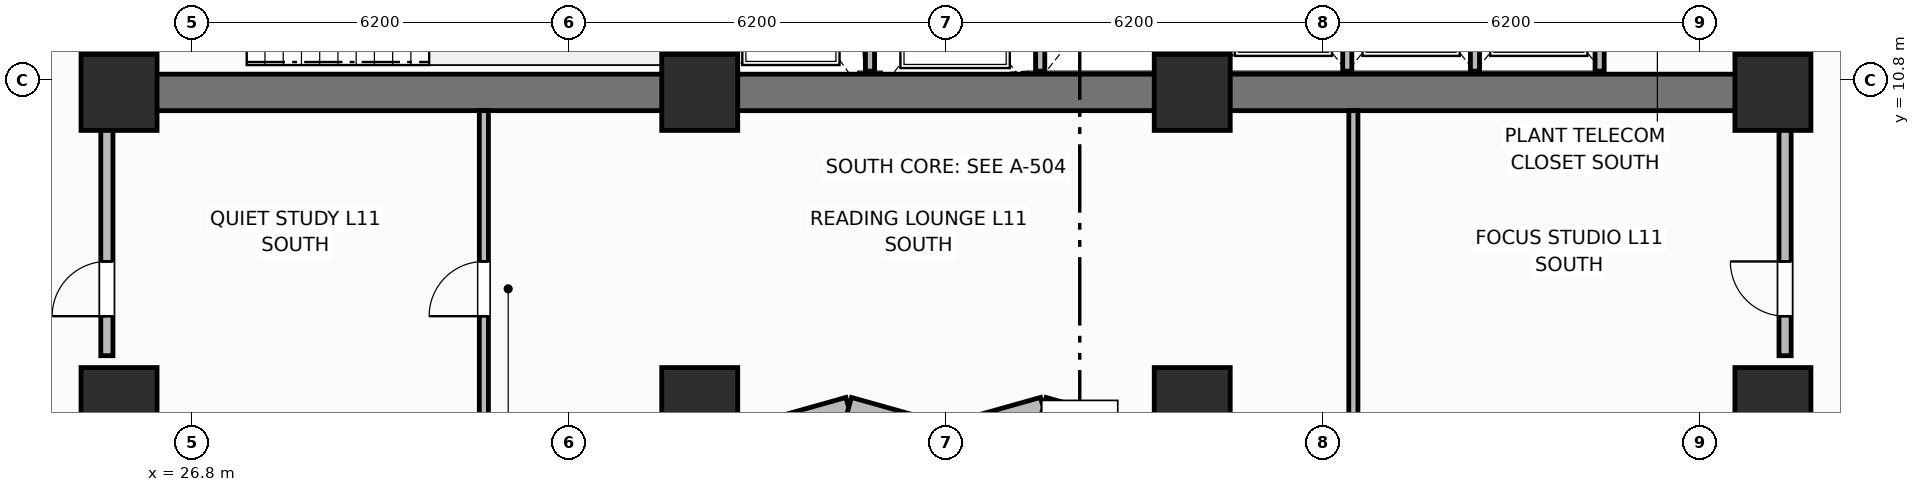
"""IFC4 building model, lengths in metres.
Left out: names, types, materials, properties, quantities, classifications, styles, units other than length and angle.
Written with IfcOpenShell. Run it as: python <this file> out.ifc"""

import sys

from ifc_helpers import new_model, si_unit, direction, frame, frame_2d, origin, origin_2d, place, context, subcontext, project, spatial, rectangle, extrude, element, fill, save


model = new_model("IFC4")
c1 = context("Model", 3, precision=1e-05, world=origin(), true_north=direction((0.0, 1.0)))
c2 = subcontext(c1, "Body", "Model", "MODEL_VIEW")
j1 = project(units=[si_unit("LENGTHUNIT", "METRE"), si_unit("PLANEANGLEUNIT", "RADIAN")], contexts=[c1])
p1 = place(None, origin())
s1 = spatial("IfcSite", under=j1, at=p1, CompositionType="ELEMENT")
p2 = place(p1, origin())
s2 = spatial("IfcBuilding", under=s1, at=p2, CompositionType="ELEMENT")
p3 = place(p2, frame((0.0, 0.0, 47.3)))
s3 = spatial("IfcBuildingStorey", under=s2, at=p3, CompositionType="ELEMENT", Elevation=47.3)
p4 = place(p3, frame((52.8, 10.6, 0.0), z_axis=(0.0, 0.0, 1.0), x_axis=(-1.0, 0.0, 0.0)))
e1 = element("IfcWall", 1, at=p4, inside=s3, PredefinedType="SHEAR", context=c2, shape_type="SweptSolid", body=[
    extrude(rectangle(XDim=27.2, YDim=0.6, at=frame_2d((13.6, 0.0))), origin(), (0.0, 0.0, 1.0), 3.7),
])
for number, where, z_axis, x_axis in (
    (2, (25.6, 10.9, 0.0), (0.0, 0.0, 1.0), (0.0, 1.0, 0.0)),
    (3, (52.8, 10.9, 0.0), (0.0, 0.0, 1.0), (0.0, 1.0, 0.0)),
):
    element("IfcWall", number, at=place(p3, frame(where, z_axis=z_axis, x_axis=x_axis)), inside=s3, PredefinedType="SHEAR", context=c2, shape_type="SweptSolid", body=[
        extrude(rectangle(XDim=5.6, YDim=0.6, at=frame_2d((2.8, 0.0))), origin(), (0.0, 0.0, 1.0), 3.7),
    ])
for number, where, z_axis, x_axis in (
    (4, (35.15, 10.9, 0.0), (0.0, 0.0, 1.0), (0.0, 1.0, 0.0)),
    (5, (43.25, 10.9, 0.0), (0.0, 0.0, 1.0), (0.0, 1.0, 0.0)),
):
    element("IfcWall", number, at=place(p3, frame(where, z_axis=z_axis, x_axis=x_axis)), inside=s3, PredefinedType="SHEAR", context=c2, shape_type="SweptSolid", body=[
        extrude(rectangle(XDim=5.6, YDim=0.4, at=frame_2d((2.8, 0.0))), origin(), (0.0, 0.0, 1.0), 3.7),
    ])
for number, where, z_axis, x_axis in (
    (6, (25.6, 10.6, 0.0), (0.0, 0.0, 1.0), (1.0, 0.0, 0.0)),
    (7, (35.15, 10.6, 0.0), (0.0, 0.0, 1.0), (1.0, 0.0, 0.0)),
    (8, (43.25, 10.6, 0.0), (0.0, 0.0, 1.0), (1.0, 0.0, 0.0)),
    (9, (52.8, 10.6, 0.0), (0.0, 0.0, 1.0), (1.0, 0.0, 0.0)),
    (10, (25.6, 5.45, 0.0), (0.0, 0.0, 1.0), (1.0, 0.0, 0.0)),
    (11, (35.15, 5.45, 0.0), (0.0, 0.0, 1.0), (1.0, 0.0, 0.0)),
    (12, (43.25, 5.45, 0.0), (0.0, 0.0, 1.0), (1.0, 0.0, 0.0)),
    (13, (52.8, 5.45, 0.0), (0.0, 0.0, 1.0), (1.0, 0.0, 0.0)),
):
    element("IfcColumn", number, at=place(p3, frame(where, z_axis=z_axis, x_axis=x_axis)), inside=s3, PredefinedType="COLUMN", context=c2, shape_type="SweptSolid", body=[
        extrude(rectangle(XDim=1.25, YDim=1.25, at=origin_2d()), origin(), (0.0, 0.0, 1.0), 3.7),
    ])
p5 = place(p3, frame((36.0, 4.97, 0.0), z_axis=(0.0, 0.0, 1.0), x_axis=(0.962662902433, 0.270703040766, 0.0)))
e14 = element("IfcWall", 14, at=p5, inside=s3, PredefinedType="SOLIDWALL", context=c2, shape_type="SweptSolid", body=[
    extrude(rectangle(XDim=1.662, YDim=0.34, at=frame_2d((0.831, 0.0))), origin(), (0.0, 0.0, 1.0), 2.7),
])
p6 = place(p3, frame((37.6, 5.42, 0.0), z_axis=(0.0, 0.0, 1.0), x_axis=(0.962652136636, -0.270741322725, 0.0)))
e15 = element("IfcWall", 15, at=p6, inside=s3, PredefinedType="SOLIDWALL", context=c2, shape_type="SweptSolid", body=[
    extrude(rectangle(XDim=1.662, YDim=0.34, at=frame_2d((0.831, 0.0))), origin(), (0.0, 0.0, 1.0), 2.7),
])
p7 = place(p3, frame((39.2, 4.97, 0.0), z_axis=(0.0, 0.0, 1.0), x_axis=(0.962662902433, 0.270703040766, 0.0)))
e16 = element("IfcWall", 16, at=p7, inside=s3, PredefinedType="SOLIDWALL", context=c2, shape_type="SweptSolid", body=[
    extrude(rectangle(XDim=1.662, YDim=0.34, at=frame_2d((0.831, 0.0))), origin(), (0.0, 0.0, 1.0), 2.7),
])
p8 = place(p3, frame((40.8, 5.42, 0.0), z_axis=(0.0, 0.0, 1.0), x_axis=(0.962652136636, -0.270741322725, 0.0)))
e17 = element("IfcWall", 17, at=p8, inside=s3, PredefinedType="SOLIDWALL", context=c2, shape_type="SweptSolid", body=[
    extrude(rectangle(XDim=1.662, YDim=0.34, at=frame_2d((0.831, 0.0))), origin(), (0.0, 0.0, 1.0), 2.7),
])
for number, where, z_axis, x_axis in (
    (18, (37.95, 10.95, 0.0), (0.0, 0.0, 1.0), (0.0, 1.0, 0.0)),
    (19, (40.75, 10.95, 0.0), (0.0, 0.0, 1.0), (0.0, 1.0, 0.0)),
):
    element("IfcWall", number, at=place(p3, frame(where, z_axis=z_axis, x_axis=x_axis)), inside=s3, PredefinedType="PARTITIONING", context=c2, shape_type="SweptSolid", body=[
        extrude(rectangle(XDim=2.75, YDim=0.15, at=frame_2d((1.375, 0.0))), origin(), (0.0, 0.0, 1.0), 2.53),
    ])
for number, where, z_axis, x_axis in (
    (20, (45.8, 10.95, 0.0), (0.0, 0.0, 1.0), (0.0, 1.0, 0.0)),
    (21, (47.9, 10.95, 0.0), (0.0, 0.0, 1.0), (0.0, 1.0, 0.0)),
    (22, (49.95, 10.95, 0.0), (0.0, 0.0, 1.0), (0.0, 1.0, 0.0)),
):
    element("IfcWall", number, at=place(p3, frame(where, z_axis=z_axis, x_axis=x_axis)), inside=s3, PredefinedType="PARTITIONING", context=c2, shape_type="SweptSolid", body=[
        extrude(rectangle(XDim=2.7, YDim=0.15, at=frame_2d((1.35, 0.0))), origin(), (0.0, 0.0, 1.0), 2.53),
    ])
p9 = place(p3, frame((31.6, 4.97, 0.0), z_axis=(0.0, 0.0, 1.0), x_axis=(0.0, 1.0, 0.0)))
e23 = element("IfcWall", 23, at=p9, inside=s3, PredefinedType="PARTITIONING", context=c2, shape_type="SweptSolid", body=[
    extrude(rectangle(XDim=5.33, YDim=0.15, at=frame_2d((2.665, 0.0))), origin(), (0.0, 0.0, 1.0), 2.53),
])
p10 = place(p9, frame((1.95, 0.0, 0.0)))
e24 = element("IfcOpeningElement", 24, at=p10, cuts=e23, PredefinedType="OPENING", context=c2, shape_type="SweptSolid", body=[
    extrude(rectangle(XDim=0.9, YDim=2.1, at=frame_2d((0.45, 1.05))), frame((0.0, 0.085, 0.0), z_axis=(0.0, -1.0, 0.0), x_axis=(1.0, 0.0, 0.0)), (0.0, 0.0, 1.0), 0.17),
])
p11 = place(p3, frame((45.9, 4.97, 0.0), z_axis=(0.0, 0.0, 1.0), x_axis=(0.0, 1.0, 0.0)))
e25 = element("IfcWall", 25, at=p11, inside=s3, PredefinedType="PARTITIONING", context=c2, shape_type="SweptSolid", body=[
    extrude(rectangle(XDim=5.33, YDim=0.15, at=frame_2d((2.665, 0.0))), origin(), (0.0, 0.0, 1.0), 2.53),
])
p12 = place(p3, frame((25.4, 6.27, 0.0), z_axis=(0.0, 0.0, 1.0), x_axis=(0.0, 1.0, 0.0)))
e26 = element("IfcWall", 26, at=p12, inside=s3, PredefinedType="PARTITIONING", context=c2, shape_type="SweptSolid", body=[
    extrude(rectangle(XDim=4.03, YDim=0.2, at=frame_2d((2.015, 0.0))), origin(), (0.0, 0.0, 1.0), 2.53),
])
p13 = place(p12, frame((0.65, 0.0, 0.0)))
e27 = element("IfcOpeningElement", 27, at=p13, cuts=e26, PredefinedType="OPENING", context=c2, shape_type="SweptSolid", body=[
    extrude(rectangle(XDim=0.9, YDim=2.1, at=frame_2d((0.45, 1.05))), frame((0.0, 0.11, 0.0), z_axis=(0.0, -1.0, 0.0), x_axis=(1.0, 0.0, 0.0)), (0.0, 0.0, 1.0), 0.22),
])
p14 = place(p3, frame((53.0, 6.27, 0.0), z_axis=(0.0, 0.0, 1.0), x_axis=(0.0, 1.0, 0.0)))
e28 = element("IfcWall", 28, at=p14, inside=s3, PredefinedType="PARTITIONING", context=c2, shape_type="SweptSolid", body=[
    extrude(rectangle(XDim=4.03, YDim=0.2, at=frame_2d((2.015, 0.0))), origin(), (0.0, 0.0, 1.0), 2.53),
])
p15 = place(p14, frame((0.65, 0.0, 0.0)))
e29 = element("IfcOpeningElement", 29, at=p15, cuts=e28, PredefinedType="OPENING", context=c2, shape_type="SweptSolid", body=[
    extrude(rectangle(XDim=0.9, YDim=2.1, at=frame_2d((0.45, 1.05))), frame((0.0, 0.11, 0.0), z_axis=(0.0, -1.0, 0.0), x_axis=(1.0, 0.0, 0.0)), (0.0, 0.0, 1.0), 0.22),
])
p16 = place(p10, origin())
e30 = element("IfcDoor", 30, at=p16, inside=s3, OperationType="SINGLE_SWING_LEFT", PredefinedType="DOOR", context=c2, shape_type="SweptSolid", body=[
    extrude(rectangle(XDim=0.9, YDim=2.1, at=frame_2d((0.45, 1.05))), frame((0.0, 0.025, 0.0), z_axis=(0.0, -1.0, 0.0), x_axis=(1.0, 0.0, 0.0)), (0.0, 0.0, 1.0), 0.05),
])
fill(e24, e30)
p17 = place(p13, origin())
e31 = element("IfcDoor", 31, at=p17, inside=s3, OperationType="SINGLE_SWING_LEFT", PredefinedType="DOOR", context=c2, shape_type="SweptSolid", body=[
    extrude(rectangle(XDim=0.9, YDim=2.1, at=frame_2d((0.45, 1.05))), frame((0.0, 0.025, 0.0), z_axis=(0.0, -1.0, 0.0), x_axis=(1.0, 0.0, 0.0)), (0.0, 0.0, 1.0), 0.05),
])
fill(e27, e31)
p18 = place(p15, origin())
e32 = element("IfcDoor", 32, at=p18, inside=s3, OperationType="SINGLE_SWING_RIGHT", PredefinedType="DOOR", context=c2, shape_type="SweptSolid", body=[
    extrude(rectangle(XDim=0.9, YDim=2.1, at=frame_2d((0.45, 1.05))), frame((0.0, 0.025, 0.0), z_axis=(0.0, -1.0, 0.0), x_axis=(1.0, 0.0, 0.0)), (0.0, 0.0, 1.0), 0.05),
])
fill(e29, e32)
save(model, sys.argv[1])
